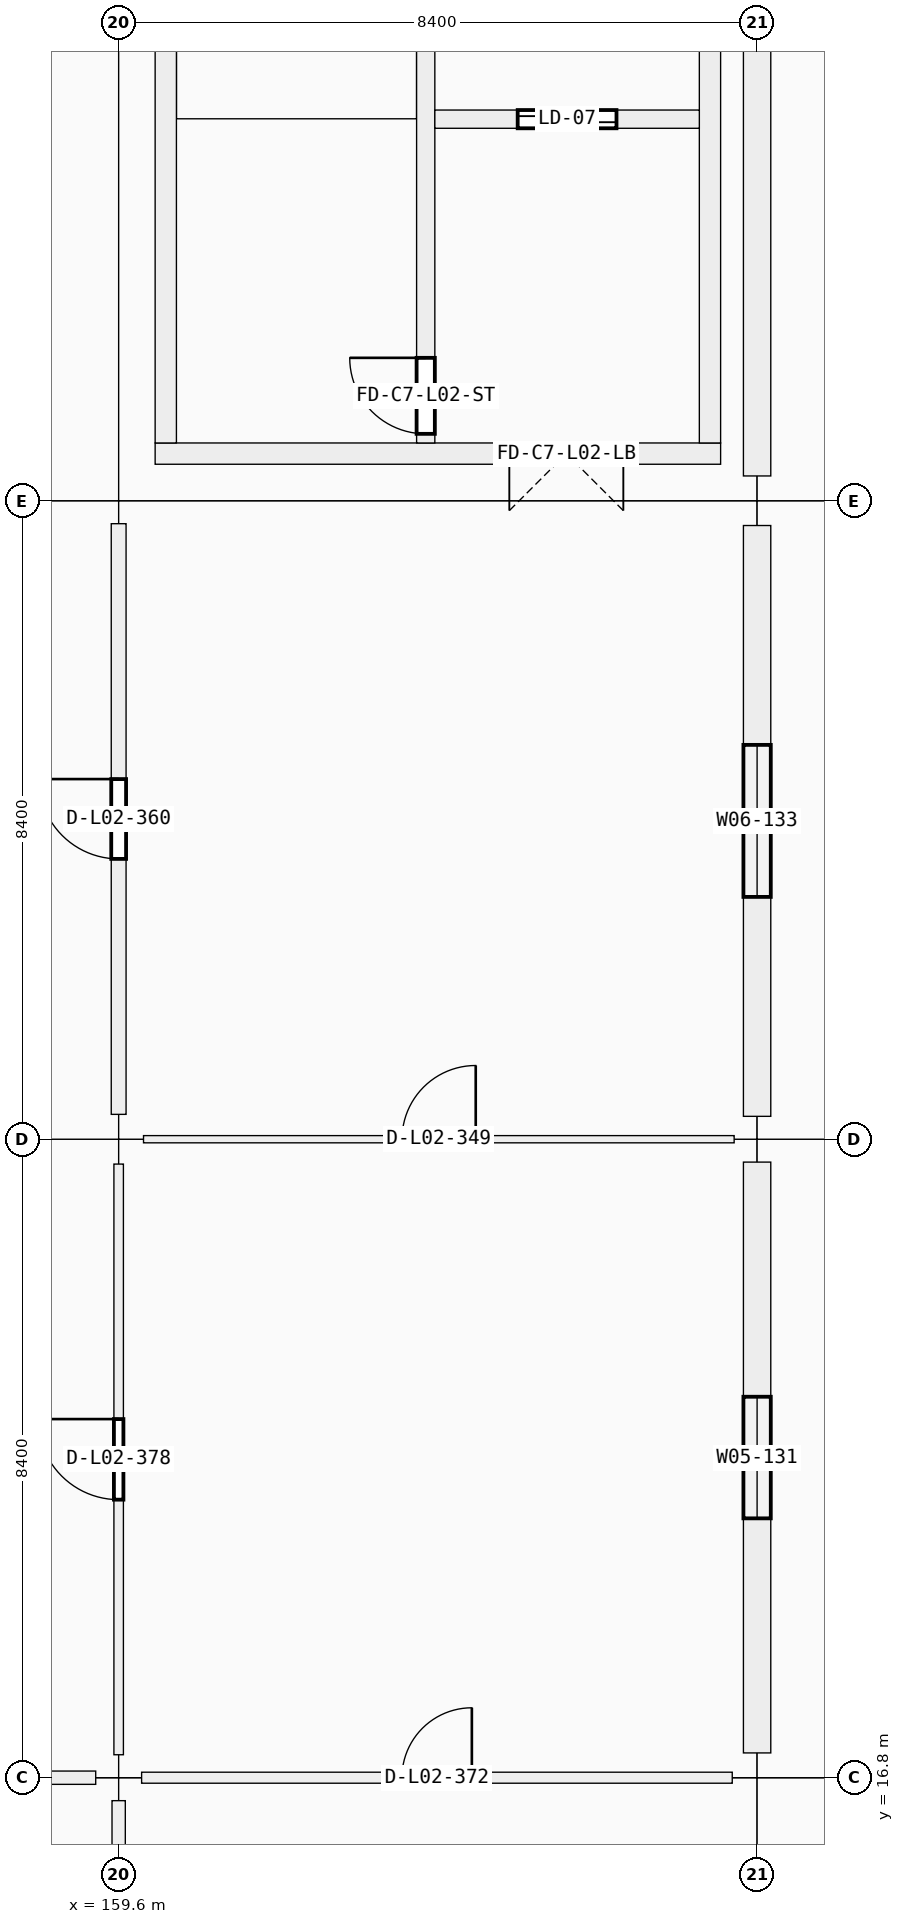
"""IFC4 building model, lengths in metres.
Left out: names, types, materials, properties, quantities, classifications, styles, units other than length and angle.
Written with IfcOpenShell. Run it as: python <this file> out.ifc"""

import sys

from ifc_helpers import new_model, si_unit, direction, frame, frame_2d, origin, origin_2d, place, context, subcontext, project, spatial, rectangle, extrude, element, fill, save


model = new_model("IFC4")
c1 = context("Model", 3, precision=1e-05, world=origin(), true_north=direction((0.0, 1.0)))
c2 = subcontext(c1, "Body", "Model", "MODEL_VIEW")
j1 = project(units=[si_unit("LENGTHUNIT", "METRE"), si_unit("PLANEANGLEUNIT", "RADIAN")], contexts=[c1])
p1 = place(None, origin())
s1 = spatial("IfcSite", under=j1, at=p1, CompositionType="ELEMENT")
p2 = place(p1, origin())
s2 = spatial("IfcBuilding", under=s1, at=p2, CompositionType="ELEMENT")
p3 = place(p2, frame((0.0, 0.0, 10.26)))
s3 = spatial("IfcBuildingStorey", under=s2, at=p3, CompositionType="ELEMENT", Elevation=10.26)
p4 = place(p3, frame((159.6, 16.8, 0.0), z_axis=(0.0, 0.0, 1.0), x_axis=(1.0, 0.0, 0.0)))
e1 = element("IfcColumn", 1, at=p4, inside=s3, PredefinedType="COLUMN", context=c2, shape_type="SweptSolid", body=[
    extrude(rectangle(XDim=0.6, YDim=0.6, at=origin_2d()), origin(), (0.0, 0.0, 1.0), 4.5),
])
p5 = place(p3, frame((159.6, 25.2, 0.0), z_axis=(0.0, 0.0, 1.0), x_axis=(1.0, 0.0, 0.0)))
e2 = element("IfcColumn", 2, at=p5, inside=s3, PredefinedType="COLUMN", context=c2, shape_type="SweptSolid", body=[
    extrude(rectangle(XDim=0.65, YDim=0.65, at=origin_2d()), origin(), (0.0, 0.0, 1.0), 4.5),
])
p6 = place(p3, frame((159.6, 33.6, 0.0), z_axis=(0.0, 0.0, 1.0), x_axis=(1.0, 0.0, 0.0)))
e3 = element("IfcColumn", 3, at=p6, inside=s3, PredefinedType="COLUMN", context=c2, shape_type="SweptSolid", body=[
    extrude(rectangle(XDim=0.6, YDim=0.6, at=origin_2d()), origin(), (0.0, 0.0, 1.0), 4.5),
])
p7 = place(p3, frame((168.0, 16.8, 0.0), z_axis=(0.0, 0.0, 1.0), x_axis=(1.0, 0.0, 0.0)))
e4 = element("IfcColumn", 4, at=p7, inside=s3, PredefinedType="COLUMN", context=c2, shape_type="SweptSolid", body=[
    extrude(rectangle(XDim=0.65, YDim=0.65, at=origin_2d()), origin(), (0.0, 0.0, 1.0), 4.5),
])
p8 = place(p3, frame((168.0, 25.2, 0.0), z_axis=(0.0, 0.0, 1.0), x_axis=(1.0, 0.0, 0.0)))
e5 = element("IfcColumn", 5, at=p8, inside=s3, PredefinedType="COLUMN", context=c2, shape_type="SweptSolid", body=[
    extrude(rectangle(XDim=0.6, YDim=0.6, at=origin_2d()), origin(), (0.0, 0.0, 1.0), 4.5),
])
p9 = place(p3, frame((168.0, 33.6, 0.0), z_axis=(0.0, 0.0, 1.0), x_axis=(1.0, 0.0, 0.0)))
e6 = element("IfcColumn", 6, at=p9, inside=s3, PredefinedType="COLUMN", context=c2, shape_type="SweptSolid", body=[
    extrude(rectangle(XDim=0.65, YDim=0.65, at=origin_2d()), origin(), (0.0, 0.0, 1.0), 4.5),
])
p10 = place(p3, frame((168.0, 24.899, 0.0), z_axis=(0.0, 0.0, 1.0), x_axis=(0.0, -1.0, 0.0)))
e7 = element("IfcWall", 7, at=p10, inside=s3, PredefinedType="SOLIDWALL", context=c2, shape_type="SweptSolid", body=[
    extrude(rectangle(XDim=7.773, YDim=0.36, at=frame_2d((3.886, 0.0))), origin(), (0.0, 0.0, 1.0), 3.54),
])
p11 = place(p10, frame((3.087, 0.0, 0.9)))
e8 = element("IfcOpeningElement", 8, at=p11, cuts=e7, PredefinedType="OPENING", context=c2, shape_type="SweptSolid", body=[
    extrude(rectangle(XDim=1.6, YDim=2.1, at=frame_2d((0.8, 1.05))), frame((0.0, 0.18, 0.0), z_axis=(0.0, -1.0, 0.0), x_axis=(1.0, 0.0, 0.0)), (0.0, 0.0, 1.0), 0.36),
])
p12 = place(p3, frame((168.0, 33.274, 0.0), z_axis=(0.0, 0.0, 1.0), x_axis=(0.0, -1.0, 0.0)))
e9 = element("IfcWall", 9, at=p12, inside=s3, PredefinedType="SOLIDWALL", context=c2, shape_type="SweptSolid", body=[
    extrude(rectangle(XDim=7.773, YDim=0.36, at=frame_2d((3.886, 0.0))), origin(), (0.0, 0.0, 1.0), 3.54),
])
p13 = place(p12, frame((2.886, 0.0, 0.9)))
e10 = element("IfcOpeningElement", 10, at=p13, cuts=e9, PredefinedType="OPENING", context=c2, shape_type="SweptSolid", body=[
    extrude(rectangle(XDim=2.0, YDim=2.1, at=frame_2d((1.0, 1.05))), frame((0.0, 0.18, 0.0), z_axis=(0.0, -1.0, 0.0), x_axis=(1.0, 0.0, 0.0)), (0.0, 0.0, 1.0), 0.36),
])
p14 = place(p3, frame((168.0, 41.699, 0.0), z_axis=(0.0, 0.0, 1.0), x_axis=(0.0, -1.0, 0.0)))
e11 = element("IfcWall", 11, at=p14, inside=s3, PredefinedType="SOLIDWALL", context=c2, shape_type="SweptSolid", body=[
    extrude(rectangle(XDim=7.773, YDim=0.36, at=frame_2d((3.886, 0.0))), origin(), (0.0, 0.0, 1.0), 3.54),
])
p15 = place(p3, frame((167.52, 34.22, 0.0), z_axis=(0.0, 0.0, 1.0), x_axis=(-1.0, 0.0, 0.0)))
e12 = element("IfcWall", 12, at=p15, inside=s3, PredefinedType="SHEAR", context=c2, shape_type="SweptSolid", body=[
    extrude(rectangle(XDim=7.44, YDim=0.28, at=frame_2d((3.72, 0.0))), origin(), (0.0, 0.0, 1.0), 4.5),
])
p16 = place(p15, frame((1.28, 0.0, 0.0)))
e13 = element("IfcOpeningElement", 13, at=p16, cuts=e12, PredefinedType="OPENING", context=c2, shape_type="SweptSolid", body=[
    extrude(rectangle(XDim=1.5, YDim=2.15, at=frame_2d((0.75, 1.075))), frame((0.0, 0.14, 0.0), z_axis=(0.0, -1.0, 0.0), x_axis=(1.0, 0.0, 0.0)), (0.0, 0.0, 1.0), 0.28),
])
for number, where, z_axis, x_axis in (
    (14, (160.22, 34.36, 0.0), (0.0, 0.0, 1.0), (0.0, 1.0, 0.0)),
    (15, (167.38, 41.24, 0.0), (0.0, 0.0, 1.0), (0.0, -1.0, 0.0)),
):
    element("IfcWall", number, at=place(p3, frame(where, z_axis=z_axis, x_axis=x_axis)), inside=s3, PredefinedType="SHEAR", context=c2, shape_type="SweptSolid", body=[
        extrude(rectangle(XDim=6.88, YDim=0.28, at=frame_2d((3.44, 0.0))), origin(), (0.0, 0.0, 1.0), 4.5),
    ])
p17 = place(p3, frame((163.64, 34.36, 0.0), z_axis=(0.0, 0.0, 1.0), x_axis=(0.0, 1.0, 0.0)))
e16 = element("IfcWall", 16, at=p17, inside=s3, PredefinedType="SHEAR", context=c2, shape_type="SweptSolid", body=[
    extrude(rectangle(XDim=6.88, YDim=0.24, at=frame_2d((3.44, 0.0))), origin(), (0.0, 0.0, 1.0), 4.5),
])
p18 = place(p17, frame((0.12, 0.0, 0.0)))
e17 = element("IfcOpeningElement", 17, at=p18, cuts=e16, PredefinedType="OPENING", context=c2, shape_type="SweptSolid", body=[
    extrude(rectangle(XDim=1.0, YDim=2.15, at=frame_2d((0.5, 1.075))), frame((0.0, 0.12, 0.0), z_axis=(0.0, -1.0, 0.0), x_axis=(1.0, 0.0, 0.0)), (0.0, 0.0, 1.0), 0.24),
])
p19 = place(p3, frame((163.76, 38.62, 0.0), z_axis=(0.0, 0.0, 1.0), x_axis=(1.0, 0.0, 0.0)))
e18 = element("IfcWall", 18, at=p19, inside=s3, PredefinedType="SHEAR", context=c2, shape_type="SweptSolid", body=[
    extrude(rectangle(XDim=3.48, YDim=0.24, at=frame_2d((1.74, 0.0))), origin(), (0.0, 0.0, 1.0), 4.5),
])
p20 = place(p19, frame((1.09, 0.0, 0.0)))
e19 = element("IfcOpeningElement", 19, at=p20, cuts=e18, PredefinedType="OPENING", context=c2, shape_type="SweptSolid", body=[
    extrude(rectangle(XDim=1.3, YDim=2.25, at=frame_2d((0.65, 1.125))), frame((0.0, 0.12, 0.0), z_axis=(0.0, -1.0, 0.0), x_axis=(1.0, 0.0, 0.0)), (0.0, 0.0, 1.0), 0.24),
])
p21 = place(p3, frame((151.527, 16.8, 0.0), z_axis=(0.0, 0.0, 1.0), x_axis=(1.0, 0.0, 0.0)))
e20 = element("IfcWall", 20, at=p21, inside=s3, PredefinedType="PARTITIONING", context=c2, shape_type="SweptSolid", body=[
    extrude(rectangle(XDim=7.771, YDim=0.175, at=frame_2d((3.885, 0.0))), origin(), (0.0, 0.0, 1.0), 3.37),
])
p22 = place(p21, frame((3.396, 0.0, 0.0)))
e21 = element("IfcOpeningElement", 21, at=p22, cuts=e20, PredefinedType="OPENING", context=c2, shape_type="SweptSolid", body=[
    extrude(rectangle(XDim=0.98, YDim=2.18, at=frame_2d((0.49, 1.09))), frame((0.0, 0.087, 0.0), z_axis=(0.0, -1.0, 0.0), x_axis=(1.0, 0.0, 0.0)), (0.0, 0.0, 1.0), 0.175),
])
p23 = place(p3, frame((159.902, 16.8, 0.0), z_axis=(0.0, 0.0, 1.0), x_axis=(1.0, 0.0, 0.0)))
e22 = element("IfcWall", 22, at=p23, inside=s3, PredefinedType="PARTITIONING", context=c2, shape_type="SweptSolid", body=[
    extrude(rectangle(XDim=7.771, YDim=0.145, at=frame_2d((3.885, 0.0))), origin(), (0.0, 0.0, 1.0), 3.37),
])
p24 = place(p23, frame((3.425, 0.0, 0.0)))
e23 = element("IfcOpeningElement", 23, at=p24, cuts=e22, PredefinedType="OPENING", context=c2, shape_type="SweptSolid", body=[
    extrude(rectangle(XDim=0.92, YDim=2.15, at=frame_2d((0.46, 1.075))), frame((0.0, 0.073, 0.0), z_axis=(0.0, -1.0, 0.0), x_axis=(1.0, 0.0, 0.0)), (0.0, 0.0, 1.0), 0.145),
])
p25 = place(p3, frame((159.927, 25.2, 0.0), z_axis=(0.0, 0.0, 1.0), x_axis=(1.0, 0.0, 0.0)))
e24 = element("IfcWall", 24, at=p25, inside=s3, PredefinedType="PARTITIONING", context=c2, shape_type="SweptSolid", body=[
    extrude(rectangle(XDim=7.771, YDim=0.095, at=frame_2d((3.885, 0.0))), origin(), (0.0, 0.0, 1.0), 3.37),
])
p26 = place(p25, frame((3.401, 0.0, 0.0)))
e25 = element("IfcOpeningElement", 25, at=p26, cuts=e24, PredefinedType="OPENING", context=c2, shape_type="SweptSolid", body=[
    extrude(rectangle(XDim=0.97, YDim=2.12, at=frame_2d((0.485, 1.06))), frame((0.0, 0.047, 0.0), z_axis=(0.0, -1.0, 0.0), x_axis=(1.0, 0.0, 0.0)), (0.0, 0.0, 1.0), 0.095),
])
p27 = place(p3, frame((159.6, 8.677, 0.0), z_axis=(0.0, 0.0, 1.0), x_axis=(0.0, 1.0, 0.0)))
e26 = element("IfcWall", 26, at=p27, inside=s3, PredefinedType="PARTITIONING", context=c2, shape_type="SweptSolid", body=[
    extrude(rectangle(XDim=7.821, YDim=0.175, at=frame_2d((3.911, 0.0))), origin(), (0.0, 0.0, 1.0), 3.37),
])
p28 = place(p27, frame((3.37, 0.0, 0.0)))
e27 = element("IfcOpeningElement", 27, at=p28, cuts=e26, PredefinedType="OPENING", context=c2, shape_type="SweptSolid", body=[
    extrude(rectangle(XDim=1.08, YDim=2.25, at=frame_2d((0.54, 1.125))), frame((0.0, 0.087, 0.0), z_axis=(0.0, -1.0, 0.0), x_axis=(1.0, 0.0, 0.0)), (0.0, 0.0, 1.0), 0.175),
])
p29 = place(p3, frame((159.6, 17.102, 0.0), z_axis=(0.0, 0.0, 1.0), x_axis=(0.0, 1.0, 0.0)))
e28 = element("IfcWall", 28, at=p29, inside=s3, PredefinedType="PARTITIONING", context=c2, shape_type="SweptSolid", body=[
    extrude(rectangle(XDim=7.771, YDim=0.125, at=frame_2d((3.885, 0.0))), origin(), (0.0, 0.0, 1.0), 3.37),
])
p30 = place(p29, frame((3.356, 0.0, 0.0)))
e29 = element("IfcOpeningElement", 29, at=p30, cuts=e28, PredefinedType="OPENING", context=c2, shape_type="SweptSolid", body=[
    extrude(rectangle(XDim=1.06, YDim=2.25, at=frame_2d((0.53, 1.125))), frame((0.0, 0.062, 0.0), z_axis=(0.0, -1.0, 0.0), x_axis=(1.0, 0.0, 0.0)), (0.0, 0.0, 1.0), 0.125),
])
p31 = place(p3, frame((159.6, 25.527, 0.0), z_axis=(0.0, 0.0, 1.0), x_axis=(0.0, 1.0, 0.0)))
e30 = element("IfcWall", 30, at=p31, inside=s3, PredefinedType="PARTITIONING", context=c2, shape_type="SweptSolid", body=[
    extrude(rectangle(XDim=7.771, YDim=0.195, at=frame_2d((3.885, 0.0))), origin(), (0.0, 0.0, 1.0), 3.37),
])
p32 = place(p31, frame((3.361, 0.0, 0.0)))
e31 = element("IfcOpeningElement", 31, at=p32, cuts=e30, PredefinedType="OPENING", context=c2, shape_type="SweptSolid", body=[
    extrude(rectangle(XDim=1.05, YDim=2.12, at=frame_2d((0.525, 1.06))), frame((0.0, 0.098, 0.0), z_axis=(0.0, -1.0, 0.0), x_axis=(1.0, 0.0, 0.0)), (0.0, 0.0, 1.0), 0.195),
])
p33 = place(p11, origin())
e32 = element("IfcWindow", 32, at=p33, inside=s3, PartitioningType="SINGLE_PANEL", PredefinedType="WINDOW", context=c2, shape_type="SweptSolid", body=[
    extrude(rectangle(XDim=1.6, YDim=2.1, at=frame_2d((0.8, 1.05))), frame((0.0, 0.03, 0.0), z_axis=(0.0, -1.0, 0.0), x_axis=(1.0, 0.0, 0.0)), (0.0, 0.0, 1.0), 0.06),
])
fill(e8, e32)
p34 = place(p13, origin())
e33 = element("IfcWindow", 33, at=p34, inside=s3, PartitioningType="SINGLE_PANEL", PredefinedType="WINDOW", context=c2, shape_type="SweptSolid", body=[
    extrude(rectangle(XDim=2.0, YDim=2.1, at=frame_2d((1.0, 1.05))), frame((0.0, 0.03, 0.0), z_axis=(0.0, -1.0, 0.0), x_axis=(1.0, 0.0, 0.0)), (0.0, 0.0, 1.0), 0.06),
])
fill(e10, e33)
p35 = place(p18, origin())
e34 = element("IfcDoor", 34, at=p35, inside=s3, OperationType="SINGLE_SWING_RIGHT", PredefinedType="DOOR", context=c2, shape_type="SweptSolid", body=[
    extrude(rectangle(XDim=1.0, YDim=2.15, at=frame_2d((0.5, 1.075))), frame((0.0, 0.025, 0.0), z_axis=(0.0, -1.0, 0.0), x_axis=(1.0, 0.0, 0.0)), (0.0, 0.0, 1.0), 0.05),
])
fill(e17, e34)
p36 = place(p16, origin())
e35 = element("IfcDoor", 35, at=p36, inside=s3, OperationType="DOUBLE_DOOR_SINGLE_SWING", PredefinedType="DOOR", context=c2, shape_type="SweptSolid", body=[
    extrude(rectangle(XDim=1.5, YDim=2.15, at=frame_2d((0.75, 1.075))), frame((0.0, 0.025, 0.0), z_axis=(0.0, -1.0, 0.0), x_axis=(1.0, 0.0, 0.0)), (0.0, 0.0, 1.0), 0.05),
])
fill(e13, e35)
p37 = place(p20, origin())
e36 = element("IfcDoor", 36, at=p37, inside=s3, OperationType="DOUBLE_DOOR_SLIDING", PredefinedType="DOOR", context=c2, shape_type="SweptSolid", body=[
    extrude(rectangle(XDim=1.3, YDim=2.25, at=frame_2d((0.65, 1.125))), frame((0.0, 0.025, 0.0), z_axis=(0.0, -1.0, 0.0), x_axis=(1.0, 0.0, 0.0)), (0.0, 0.0, 1.0), 0.05),
])
fill(e19, e36)
p38 = place(p26, origin())
e37 = element("IfcDoor", 37, at=p38, inside=s3, OperationType="SINGLE_SWING_RIGHT", PredefinedType="DOOR", context=c2, shape_type="SweptSolid", body=[
    extrude(rectangle(XDim=0.97, YDim=2.12, at=frame_2d((0.485, 1.06))), frame((0.0, 0.025, 0.0), z_axis=(0.0, -1.0, 0.0), x_axis=(1.0, 0.0, 0.0)), (0.0, 0.0, 1.0), 0.05),
])
fill(e25, e37)
p39 = place(p32, origin())
e38 = element("IfcDoor", 38, at=p39, inside=s3, OperationType="SINGLE_SWING_RIGHT", PredefinedType="DOOR", context=c2, shape_type="SweptSolid", body=[
    extrude(rectangle(XDim=1.05, YDim=2.12, at=frame_2d((0.525, 1.06))), frame((0.0, 0.025, 0.0), z_axis=(0.0, -1.0, 0.0), x_axis=(1.0, 0.0, 0.0)), (0.0, 0.0, 1.0), 0.05),
])
fill(e31, e38)
p40 = place(p24, origin())
e39 = element("IfcDoor", 39, at=p40, inside=s3, OperationType="SINGLE_SWING_RIGHT", PredefinedType="DOOR", context=c2, shape_type="SweptSolid", body=[
    extrude(rectangle(XDim=0.92, YDim=2.15, at=frame_2d((0.46, 1.075))), frame((0.0, 0.025, 0.0), z_axis=(0.0, -1.0, 0.0), x_axis=(1.0, 0.0, 0.0)), (0.0, 0.0, 1.0), 0.05),
])
fill(e23, e39)
p41 = place(p30, origin())
e40 = element("IfcDoor", 40, at=p41, inside=s3, OperationType="SINGLE_SWING_RIGHT", PredefinedType="DOOR", context=c2, shape_type="SweptSolid", body=[
    extrude(rectangle(XDim=1.06, YDim=2.25, at=frame_2d((0.53, 1.125))), frame((0.0, 0.025, 0.0), z_axis=(0.0, -1.0, 0.0), x_axis=(1.0, 0.0, 0.0)), (0.0, 0.0, 1.0), 0.05),
])
fill(e29, e40)
save(model, sys.argv[1])
